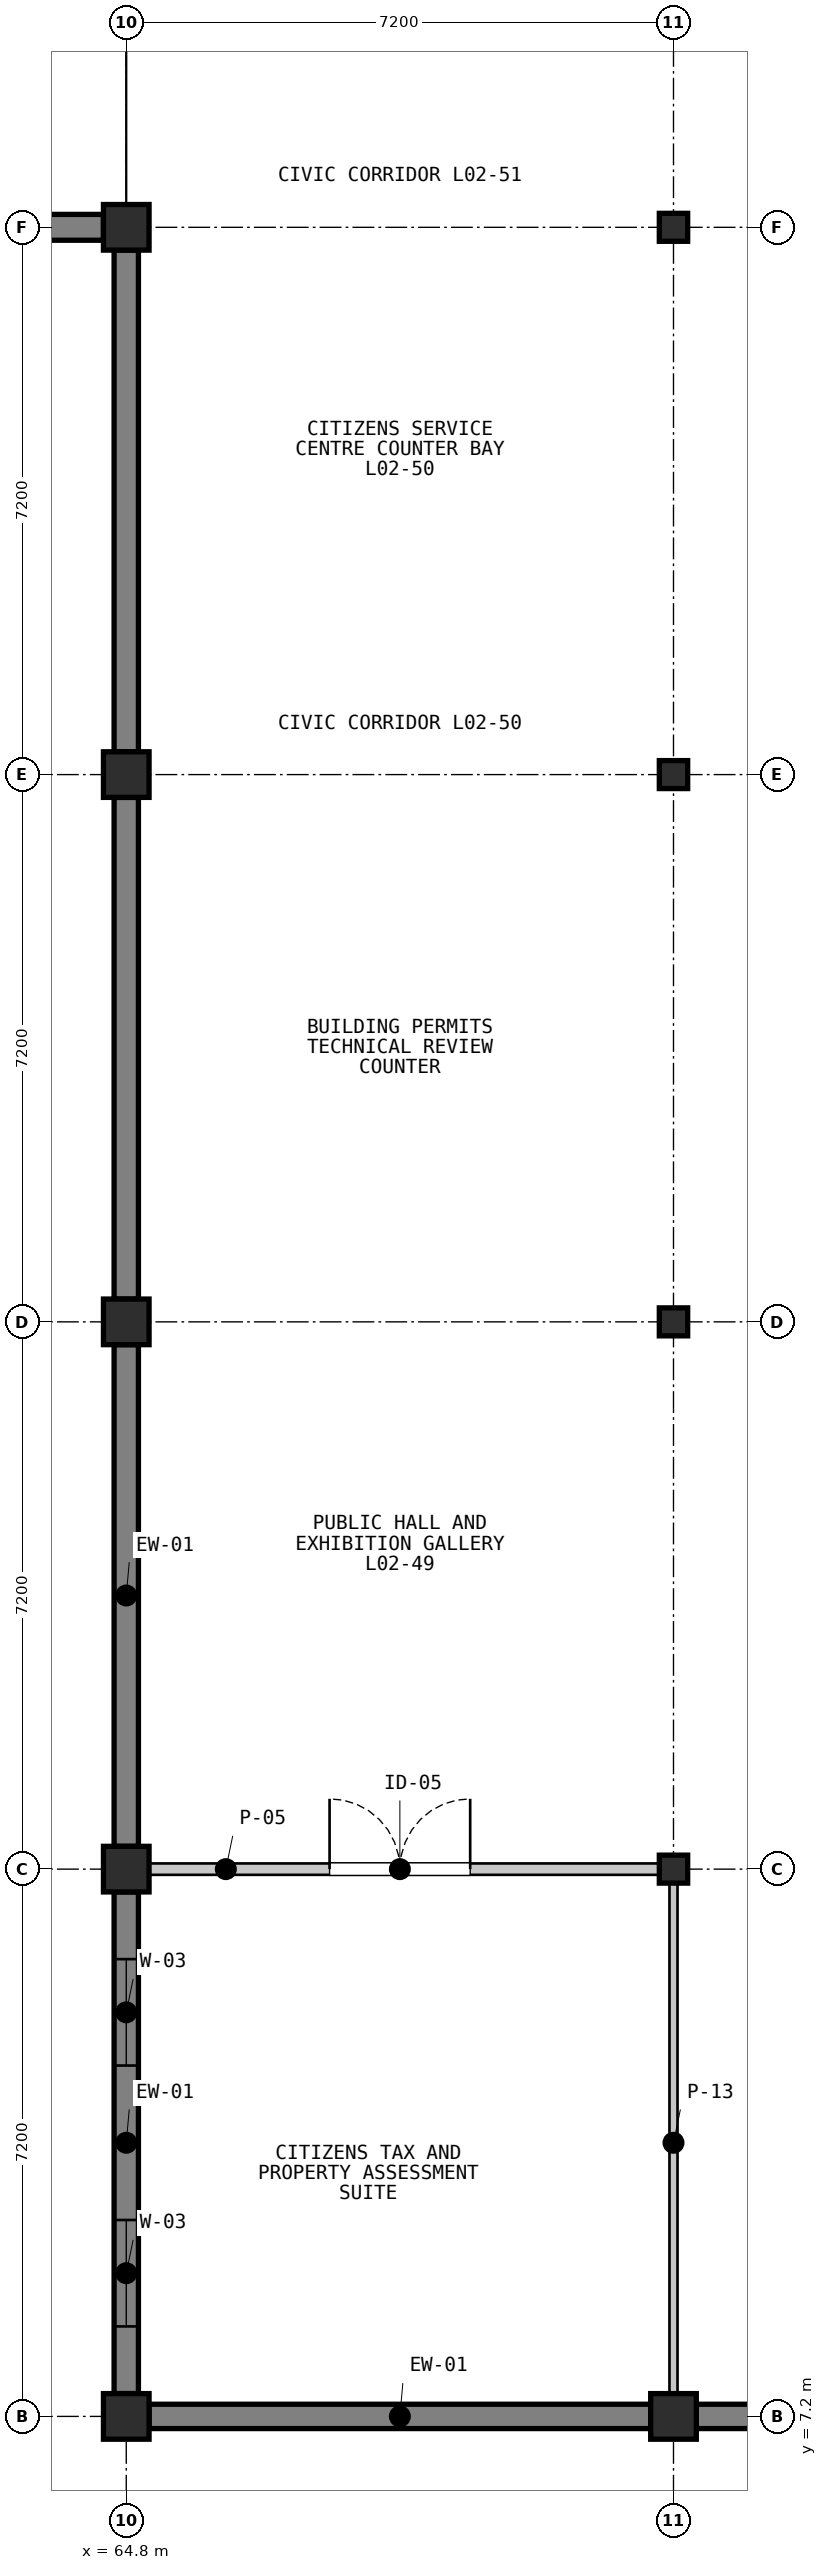
"""IFC4 building model, lengths in metres.
Left out: names, types, materials, properties, quantities, classifications, styles, units other than length and angle.
Written with IfcOpenShell. Run it as: python <this file> out.ifc"""

import sys

from ifc_helpers import new_model, si_unit, direction, frame, frame_2d, origin, origin_2d, place, context, subcontext, project, spatial, rectangle, i_section, extrude, element, fill, save


model = new_model("IFC4")
c1 = context("Model", 3, precision=1e-05, world=origin(), true_north=direction((0.0, 1.0)))
c2 = subcontext(c1, "Body", "Model", "MODEL_VIEW")
j1 = project(units=[si_unit("LENGTHUNIT", "METRE"), si_unit("PLANEANGLEUNIT", "RADIAN")], contexts=[c1])
p1 = place(None, origin())
s1 = spatial("IfcSite", under=j1, at=p1, CompositionType="ELEMENT")
p2 = place(p1, origin())
s2 = spatial("IfcBuilding", under=s1, at=p2, CompositionType="ELEMENT")
p3 = place(p2, frame((0.0, 0.0, 5.4)))
s3 = spatial("IfcBuildingStorey", under=s2, at=p3, CompositionType="ELEMENT", Elevation=5.4)
for number, where, z_axis, x_axis in (
    (1, (64.8, 7.2, 0.0), (0.0, 0.0, 1.0), (1.0, 0.0, 0.0)),
    (2, (64.8, 14.4, 0.0), (0.0, 0.0, 1.0), (1.0, 0.0, 0.0)),
    (3, (64.8, 21.6, 0.0), (0.0, 0.0, 1.0), (1.0, 0.0, 0.0)),
    (4, (64.8, 28.8, 0.0), (0.0, 0.0, 1.0), (1.0, 0.0, 0.0)),
    (5, (64.8, 36.0, 0.0), (0.0, 0.0, 1.0), (1.0, 0.0, 0.0)),
    (6, (72.0, 7.2, 0.0), (0.0, 0.0, 1.0), (1.0, 0.0, 0.0)),
):
    element("IfcColumn", number, at=place(p3, frame(where, z_axis=z_axis, x_axis=x_axis)), inside=s3, PredefinedType="COLUMN", context=c2, shape_type="SweptSolid", body=[
        extrude(rectangle(XDim=0.6, YDim=0.6, at=origin_2d()), origin(), (0.0, 0.0, 1.0), 4.5),
    ])
for number, where, z_axis, x_axis in (
    (7, (72.0, 14.4, 0.0), (0.0, 0.0, 1.0), (1.0, 0.0, 0.0)),
    (8, (72.0, 21.6, 0.0), (0.0, 0.0, 1.0), (1.0, 0.0, 0.0)),
    (9, (72.0, 28.8, 0.0), (0.0, 0.0, 1.0), (1.0, 0.0, 0.0)),
    (10, (72.0, 36.0, 0.0), (0.0, 0.0, 1.0), (1.0, 0.0, 0.0)),
):
    element("IfcColumn", number, at=place(p3, frame(where, z_axis=z_axis, x_axis=x_axis)), inside=s3, PredefinedType="COLUMN", context=c2, shape_type="SweptSolid", body=[
        extrude(i_section(OverallWidth=0.373, OverallDepth=0.368, WebThickness=0.015, FlangeThickness=0.024, FilletRadius=0.015, at=origin_2d()), origin(), (0.0, 0.0, 1.0), 4.5),
    ])
p4 = place(p3, frame((64.5, 36.0, 0.0), z_axis=(0.0, 0.0, 1.0), x_axis=(-1.0, 0.0, 0.0)))
e11 = element("IfcWall", 11, at=p4, inside=s3, PredefinedType="SOLIDWALL", context=c2, shape_type="SweptSolid", body=[
    extrude(rectangle(XDim=6.65, YDim=0.34, at=frame_2d((3.325, 0.0))), origin(), (0.0, 0.0, 1.0), 3.698),
])
p5 = place(p3, frame((71.7, 7.2, 0.0), z_axis=(0.0, 0.0, 1.0), x_axis=(-1.0, 0.0, 0.0)))
e12 = element("IfcWall", 12, at=p5, inside=s3, PredefinedType="SOLIDWALL", context=c2, shape_type="SweptSolid", body=[
    extrude(rectangle(XDim=6.6, YDim=0.32, at=frame_2d((3.3, 0.0))), origin(), (0.0, 0.0, 1.0), 3.698),
])
p6 = place(p3, frame((64.8, 7.5, 0.0), z_axis=(0.0, 0.0, 1.0), x_axis=(0.0, 1.0, 0.0)))
e13 = element("IfcWall", 13, at=p6, inside=s3, PredefinedType="SOLIDWALL", context=c2, shape_type="SweptSolid", body=[
    extrude(rectangle(XDim=6.6, YDim=0.32, at=frame_2d((3.3, 0.0))), origin(), (0.0, 0.0, 1.0), 3.767),
])
p7 = place(p6, frame((0.884, 0.0, 0.95)))
e14 = element("IfcOpeningElement", 14, at=p7, cuts=e13, PredefinedType="OPENING", context=c2, shape_type="SweptSolid", body=[
    extrude(rectangle(XDim=1.4, YDim=2.1, at=frame_2d((0.7, 1.05))), frame((0.0, 0.17, 0.0), z_axis=(0.0, -1.0, 0.0), x_axis=(1.0, 0.0, 0.0)), (0.0, 0.0, 1.0), 0.34),
])
p8 = place(p6, frame((4.316, 0.0, 0.95)))
e15 = element("IfcOpeningElement", 15, at=p8, cuts=e13, PredefinedType="OPENING", context=c2, shape_type="SweptSolid", body=[
    extrude(rectangle(XDim=1.4, YDim=2.1, at=frame_2d((0.7, 1.05))), frame((0.0, 0.17, 0.0), z_axis=(0.0, -1.0, 0.0), x_axis=(1.0, 0.0, 0.0)), (0.0, 0.0, 1.0), 0.34),
])
for number, where, z_axis, x_axis in (
    (16, (64.8, 14.7, 0.0), (0.0, 0.0, 1.0), (0.0, 1.0, 0.0)),
    (17, (64.8, 21.9, 0.0), (0.0, 0.0, 1.0), (0.0, 1.0, 0.0)),
):
    element("IfcWall", number, at=place(p3, frame(where, z_axis=z_axis, x_axis=x_axis)), inside=s3, PredefinedType="SOLIDWALL", context=c2, shape_type="SweptSolid", body=[
        extrude(rectangle(XDim=6.6, YDim=0.32, at=frame_2d((3.3, 0.0))), origin(), (0.0, 0.0, 1.0), 3.767),
    ])
p9 = place(p3, frame((64.8, 29.1, 0.0), z_axis=(0.0, 0.0, 1.0), x_axis=(0.0, 1.0, 0.0)))
e18 = element("IfcWall", 18, at=p9, inside=s3, PredefinedType="SOLIDWALL", context=c2, shape_type="SweptSolid", body=[
    extrude(rectangle(XDim=6.6, YDim=0.32, at=frame_2d((3.3, 0.0))), origin(), (0.0, 0.0, 1.0), 3.767),
])
p10 = place(p3, frame((78.9, 7.2, 0.0), z_axis=(0.0, 0.0, 1.0), x_axis=(-1.0, 0.0, 0.0)))
e19 = element("IfcWall", 19, at=p10, inside=s3, PredefinedType="SOLIDWALL", context=c2, shape_type="SweptSolid", body=[
    extrude(rectangle(XDim=6.6, YDim=0.32, at=frame_2d((3.3, 0.0))), origin(), (0.0, 0.0, 1.0), 3.698),
])
p11 = place(p3, frame((64.92, 14.4, 0.0), z_axis=(0.0, 0.0, 1.0), x_axis=(1.0, 0.0, 0.0)))
e20 = element("IfcWall", 20, at=p11, inside=s3, PredefinedType="PARTITIONING", context=c2, shape_type="SweptSolid", body=[
    extrude(rectangle(XDim=6.96, YDim=0.15, at=frame_2d((3.48, 0.0))), origin(), (0.0, 0.0, 1.0), 3.688),
])
p12 = place(p11, frame((2.555, 0.0, 0.0)))
e21 = element("IfcOpeningElement", 21, at=p12, cuts=e20, PredefinedType="OPENING", context=c2, shape_type="SweptSolid", body=[
    extrude(rectangle(XDim=1.85, YDim=2.45, at=frame_2d((0.925, 1.225))), frame((0.0, 0.085, 0.0), z_axis=(0.0, -1.0, 0.0), x_axis=(1.0, 0.0, 0.0)), (0.0, 0.0, 1.0), 0.17),
])
p13 = place(p3, frame((72.0, 14.28, 0.0), z_axis=(0.0, 0.0, 1.0), x_axis=(0.0, -1.0, 0.0)))
e22 = element("IfcWall", 22, at=p13, inside=s3, PredefinedType="PARTITIONING", context=c2, shape_type="SweptSolid", body=[
    extrude(rectangle(XDim=6.96, YDim=0.106, at=frame_2d((3.48, 0.0))), origin(), (0.0, 0.0, 1.0), 3.688),
])
p14 = place(p7, origin())
e23 = element("IfcWindow", 23, at=p14, inside=s3, PartitioningType="SINGLE_PANEL", PredefinedType="WINDOW", context=c2, shape_type="SweptSolid", body=[
    extrude(rectangle(XDim=1.4, YDim=2.1, at=frame_2d((0.7, 1.05))), frame((0.0, 0.03, 0.0), z_axis=(0.0, -1.0, 0.0), x_axis=(1.0, 0.0, 0.0)), (0.0, 0.0, 1.0), 0.06),
])
fill(e14, e23)
p15 = place(p8, origin())
e24 = element("IfcWindow", 24, at=p15, inside=s3, PartitioningType="SINGLE_PANEL", PredefinedType="WINDOW", context=c2, shape_type="SweptSolid", body=[
    extrude(rectangle(XDim=1.4, YDim=2.1, at=frame_2d((0.7, 1.05))), frame((0.0, 0.03, 0.0), z_axis=(0.0, -1.0, 0.0), x_axis=(1.0, 0.0, 0.0)), (0.0, 0.0, 1.0), 0.06),
])
fill(e15, e24)
p16 = place(p12, origin())
e25 = element("IfcDoor", 25, at=p16, inside=s3, OperationType="DOUBLE_DOOR_SINGLE_SWING", PredefinedType="DOOR", context=c2, shape_type="SweptSolid", body=[
    extrude(rectangle(XDim=1.85, YDim=2.45, at=frame_2d((0.925, 1.225))), frame((0.0, 0.025, 0.0), z_axis=(0.0, -1.0, 0.0), x_axis=(1.0, 0.0, 0.0)), (0.0, 0.0, 1.0), 0.05),
])
fill(e21, e25)
save(model, sys.argv[1])
